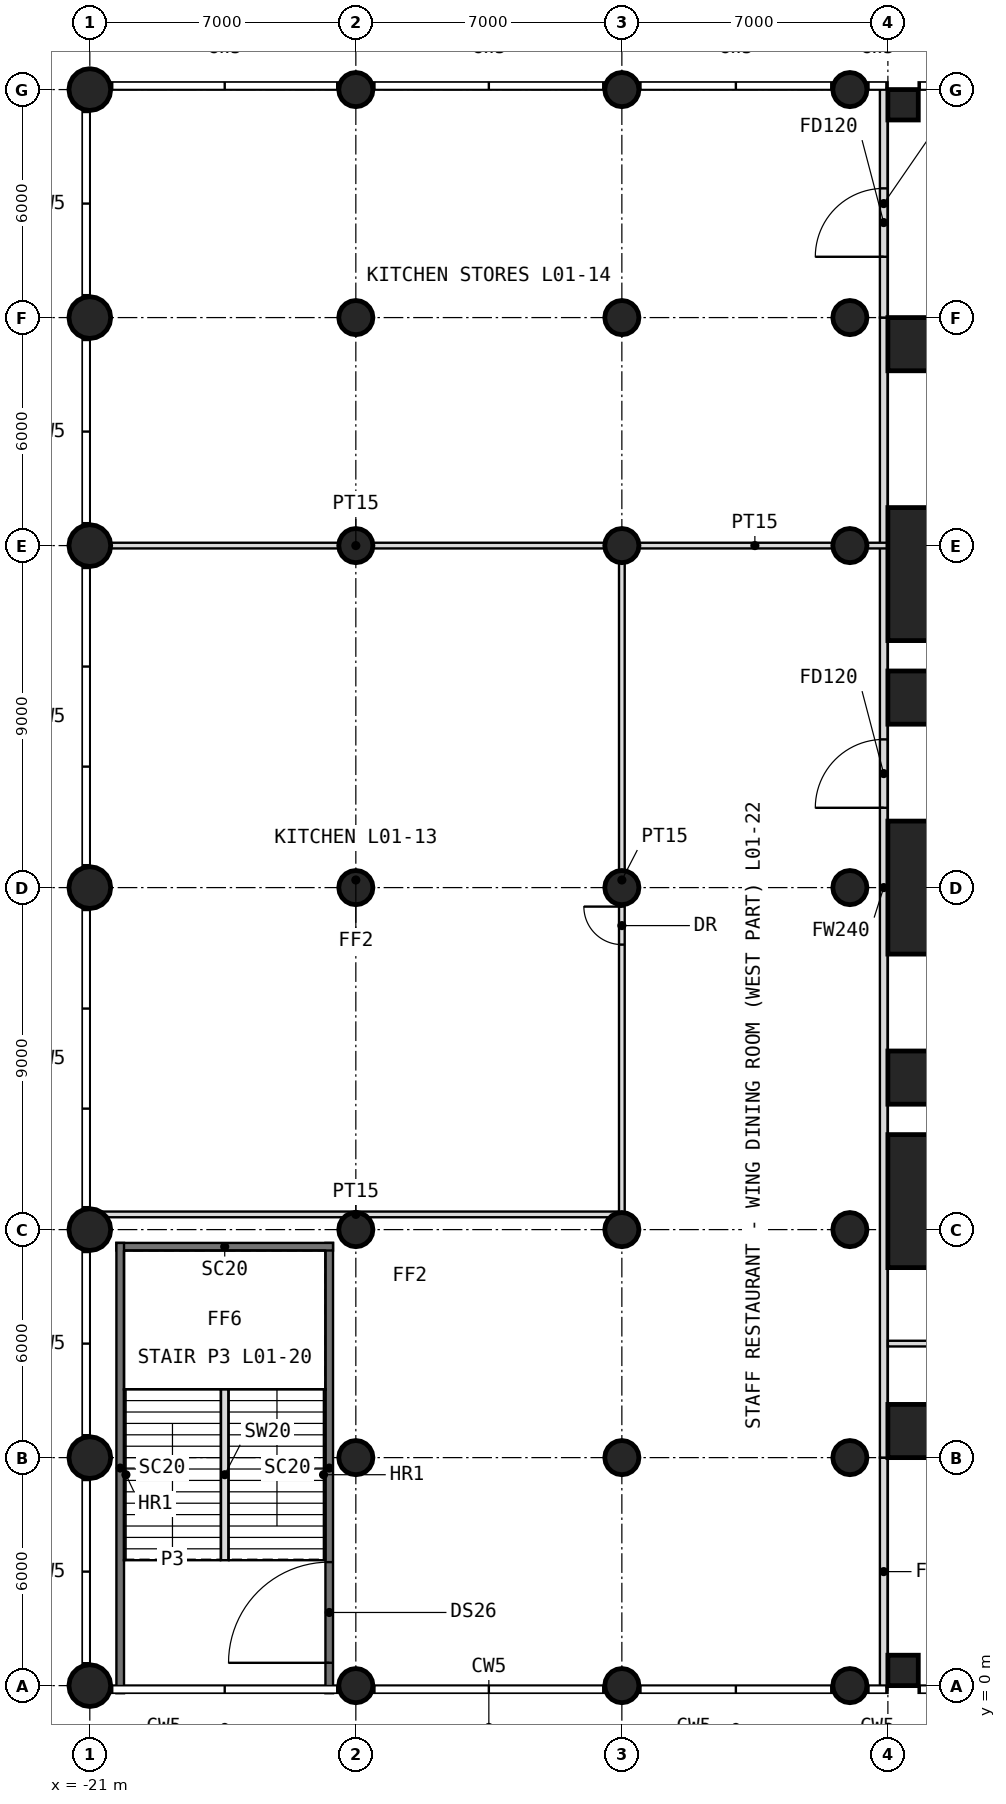
"""IFC4 building model, lengths in metres.
Left out: names, types, materials, properties, quantities, classifications, styles, units other than length and angle.
Written with IfcOpenShell. Run it as: python <this file> out.ifc"""

import sys

from ifc_helpers import new_model, si_unit, direction, frame, frame_2d, origin, origin_2d, place, context, subcontext, project, spatial, rectangle, circle, extrude, element, fill, save


model = new_model("IFC4")
c1 = context("Model", 3, precision=1e-05, world=origin(), true_north=direction((0.0, 1.0)))
c2 = subcontext(c1, "Body", "Model", "MODEL_VIEW")
j1 = project(units=[si_unit("LENGTHUNIT", "METRE"), si_unit("PLANEANGLEUNIT", "RADIAN")], contexts=[c1])
p1 = place(None, origin())
s1 = spatial("IfcSite", under=j1, at=p1, CompositionType="ELEMENT")
p2 = place(p1, origin())
s2 = spatial("IfcBuilding", under=s1, at=p2, CompositionType="ELEMENT")
p3 = place(p2, frame((0.0, 0.0, 6.0)))
s3 = spatial("IfcBuildingStorey", under=s2, at=p3, CompositionType="ELEMENT", Elevation=6.0)
p4 = place(p3, frame((-21.0, 0.0, 0.0), z_axis=(0.0, 0.0, 1.0), x_axis=(1.0, 0.0, 0.0)))
e1 = element("IfcColumn", 1, at=p4, inside=s3, PredefinedType="COLUMN", context=c2, shape_type="SweptSolid", body=[
    extrude(circle(Radius=0.55, at=origin_2d()), origin(), (0.0, 0.0, 1.0), 5.0),
])
for number, where, z_axis, x_axis in (
    (2, (-14.0, 0.0, 0.0), (0.0, 0.0, 1.0), (1.0, 0.0, 0.0)),
    (3, (-7.0, 0.0, 0.0), (0.0, 0.0, 1.0), (1.0, 0.0, 0.0)),
    (4, (-1.0, 0.0, 0.0), (0.0, 0.0, 1.0), (1.0, 0.0, 0.0)),
):
    element("IfcColumn", number, at=place(p3, frame(where, z_axis=z_axis, x_axis=x_axis)), inside=s3, PredefinedType="COLUMN", context=c2, shape_type="SweptSolid", body=[
        extrude(circle(Radius=0.45, at=origin_2d()), origin(), (0.0, 0.0, 1.0), 5.0),
    ])
p5 = place(p3, frame((0.4, 0.4, 0.0), z_axis=(0.0, 0.0, 1.0), x_axis=(1.0, 0.0, 0.0)))
e5 = element("IfcColumn", 5, at=p5, inside=s3, PredefinedType="COLUMN", context=c2, shape_type="SweptSolid", body=[
    extrude(rectangle(XDim=0.8, YDim=0.8, at=origin_2d()), origin(), (0.0, 0.0, 1.0), 5.0),
])
p6 = place(p3, frame((-21.0, 6.0, 0.0), z_axis=(0.0, 0.0, 1.0), x_axis=(1.0, 0.0, 0.0)))
e6 = element("IfcColumn", 6, at=p6, inside=s3, PredefinedType="COLUMN", context=c2, shape_type="SweptSolid", body=[
    extrude(circle(Radius=0.55, at=origin_2d()), origin(), (0.0, 0.0, 1.0), 5.0),
])
for number, where, z_axis, x_axis in (
    (7, (-14.0, 6.0, 0.0), (0.0, 0.0, 1.0), (1.0, 0.0, 0.0)),
    (8, (-7.0, 6.0, 0.0), (0.0, 0.0, 1.0), (1.0, 0.0, 0.0)),
    (9, (-1.0, 6.0, 0.0), (0.0, 0.0, 1.0), (1.0, 0.0, 0.0)),
):
    element("IfcColumn", number, at=place(p3, frame(where, z_axis=z_axis, x_axis=x_axis)), inside=s3, PredefinedType="COLUMN", context=c2, shape_type="SweptSolid", body=[
        extrude(circle(Radius=0.45, at=origin_2d()), origin(), (0.0, 0.0, 1.0), 5.0),
    ])
p7 = place(p3, frame((0.7, 6.7, 0.0), z_axis=(0.0, 0.0, 1.0), x_axis=(1.0, 0.0, 0.0)))
e10 = element("IfcColumn", 10, at=p7, inside=s3, PredefinedType="COLUMN", context=c2, shape_type="SweptSolid", body=[
    extrude(rectangle(XDim=1.4, YDim=1.4, at=origin_2d()), origin(), (0.0, 0.0, 1.0), 5.0),
])
p8 = place(p3, frame((1.75, 12.75, 0.0), z_axis=(0.0, 0.0, 1.0), x_axis=(1.0, 0.0, 0.0)))
e11 = element("IfcColumn", 11, at=p8, inside=s3, PredefinedType="COLUMN", context=c2, shape_type="SweptSolid", body=[
    extrude(rectangle(XDim=3.5, YDim=3.5, at=origin_2d()), origin(), (0.0, 0.0, 1.0), 5.0),
])
p9 = place(p3, frame((-21.0, 12.0, 0.0), z_axis=(0.0, 0.0, 1.0), x_axis=(1.0, 0.0, 0.0)))
e12 = element("IfcColumn", 12, at=p9, inside=s3, PredefinedType="COLUMN", context=c2, shape_type="SweptSolid", body=[
    extrude(circle(Radius=0.55, at=origin_2d()), origin(), (0.0, 0.0, 1.0), 5.0),
])
for number, where, z_axis, x_axis in (
    (13, (-14.0, 12.0, 0.0), (0.0, 0.0, 1.0), (1.0, 0.0, 0.0)),
    (14, (-7.0, 12.0, 0.0), (0.0, 0.0, 1.0), (1.0, 0.0, 0.0)),
    (15, (-1.0, 12.0, 0.0), (0.0, 0.0, 1.0), (1.0, 0.0, 0.0)),
):
    element("IfcColumn", number, at=place(p3, frame(where, z_axis=z_axis, x_axis=x_axis)), inside=s3, PredefinedType="COLUMN", context=c2, shape_type="SweptSolid", body=[
        extrude(circle(Radius=0.45, at=origin_2d()), origin(), (0.0, 0.0, 1.0), 5.0),
    ])
p10 = place(p3, frame((0.7, 16.0, 0.0), z_axis=(0.0, 0.0, 1.0), x_axis=(1.0, 0.0, 0.0)))
e16 = element("IfcColumn", 16, at=p10, inside=s3, PredefinedType="COLUMN", context=c2, shape_type="SweptSolid", body=[
    extrude(rectangle(XDim=1.4, YDim=1.4, at=origin_2d()), origin(), (0.0, 0.0, 1.0), 5.0),
])
p11 = place(p3, frame((-21.0, 21.0, 0.0), z_axis=(0.0, 0.0, 1.0), x_axis=(1.0, 0.0, 0.0)))
e17 = element("IfcColumn", 17, at=p11, inside=s3, PredefinedType="COLUMN", context=c2, shape_type="SweptSolid", body=[
    extrude(circle(Radius=0.55, at=origin_2d()), origin(), (0.0, 0.0, 1.0), 5.0),
])
for number, where, z_axis, x_axis in (
    (18, (-14.0, 21.0, 0.0), (0.0, 0.0, 1.0), (1.0, 0.0, 0.0)),
    (19, (-7.0, 21.0, 0.0), (0.0, 0.0, 1.0), (1.0, 0.0, 0.0)),
    (20, (-1.0, 21.0, 0.0), (0.0, 0.0, 1.0), (1.0, 0.0, 0.0)),
):
    element("IfcColumn", number, at=place(p3, frame(where, z_axis=z_axis, x_axis=x_axis)), inside=s3, PredefinedType="COLUMN", context=c2, shape_type="SweptSolid", body=[
        extrude(circle(Radius=0.45, at=origin_2d()), origin(), (0.0, 0.0, 1.0), 5.0),
    ])
p12 = place(p3, frame((1.75, 21.0, 0.0), z_axis=(0.0, 0.0, 1.0), x_axis=(1.0, 0.0, 0.0)))
e21 = element("IfcColumn", 21, at=p12, inside=s3, PredefinedType="COLUMN", context=c2, shape_type="SweptSolid", body=[
    extrude(rectangle(XDim=3.5, YDim=3.5, at=origin_2d()), origin(), (0.0, 0.0, 1.0), 5.0),
])
p13 = place(p3, frame((0.7, 26.0, 0.0), z_axis=(0.0, 0.0, 1.0), x_axis=(1.0, 0.0, 0.0)))
e22 = element("IfcColumn", 22, at=p13, inside=s3, PredefinedType="COLUMN", context=c2, shape_type="SweptSolid", body=[
    extrude(rectangle(XDim=1.4, YDim=1.4, at=origin_2d()), origin(), (0.0, 0.0, 1.0), 5.0),
])
p14 = place(p3, frame((-21.0, 30.0, 0.0), z_axis=(0.0, 0.0, 1.0), x_axis=(1.0, 0.0, 0.0)))
e23 = element("IfcColumn", 23, at=p14, inside=s3, PredefinedType="COLUMN", context=c2, shape_type="SweptSolid", body=[
    extrude(circle(Radius=0.55, at=origin_2d()), origin(), (0.0, 0.0, 1.0), 5.0),
])
for number, where, z_axis, x_axis in (
    (24, (-14.0, 30.0, 0.0), (0.0, 0.0, 1.0), (1.0, 0.0, 0.0)),
    (25, (-7.0, 30.0, 0.0), (0.0, 0.0, 1.0), (1.0, 0.0, 0.0)),
    (26, (-1.0, 30.0, 0.0), (0.0, 0.0, 1.0), (1.0, 0.0, 0.0)),
):
    element("IfcColumn", number, at=place(p3, frame(where, z_axis=z_axis, x_axis=x_axis)), inside=s3, PredefinedType="COLUMN", context=c2, shape_type="SweptSolid", body=[
        extrude(circle(Radius=0.45, at=origin_2d()), origin(), (0.0, 0.0, 1.0), 5.0),
    ])
p15 = place(p3, frame((1.75, 29.25, 0.0), z_axis=(0.0, 0.0, 1.0), x_axis=(1.0, 0.0, 0.0)))
e27 = element("IfcColumn", 27, at=p15, inside=s3, PredefinedType="COLUMN", context=c2, shape_type="SweptSolid", body=[
    extrude(rectangle(XDim=3.5, YDim=3.5, at=origin_2d()), origin(), (0.0, 0.0, 1.0), 5.0),
])
p16 = place(p3, frame((-21.0, 36.0, 0.0), z_axis=(0.0, 0.0, 1.0), x_axis=(1.0, 0.0, 0.0)))
e28 = element("IfcColumn", 28, at=p16, inside=s3, PredefinedType="COLUMN", context=c2, shape_type="SweptSolid", body=[
    extrude(circle(Radius=0.55, at=origin_2d()), origin(), (0.0, 0.0, 1.0), 5.0),
])
for number, where, z_axis, x_axis in (
    (29, (-14.0, 36.0, 0.0), (0.0, 0.0, 1.0), (1.0, 0.0, 0.0)),
    (30, (-7.0, 36.0, 0.0), (0.0, 0.0, 1.0), (1.0, 0.0, 0.0)),
    (31, (-1.0, 36.0, 0.0), (0.0, 0.0, 1.0), (1.0, 0.0, 0.0)),
):
    element("IfcColumn", number, at=place(p3, frame(where, z_axis=z_axis, x_axis=x_axis)), inside=s3, PredefinedType="COLUMN", context=c2, shape_type="SweptSolid", body=[
        extrude(circle(Radius=0.45, at=origin_2d()), origin(), (0.0, 0.0, 1.0), 5.0),
    ])
p17 = place(p3, frame((0.7, 35.3, 0.0), z_axis=(0.0, 0.0, 1.0), x_axis=(1.0, 0.0, 0.0)))
e32 = element("IfcColumn", 32, at=p17, inside=s3, PredefinedType="COLUMN", context=c2, shape_type="SweptSolid", body=[
    extrude(rectangle(XDim=1.4, YDim=1.4, at=origin_2d()), origin(), (0.0, 0.0, 1.0), 5.0),
])
p18 = place(p3, frame((-21.0, 42.0, 0.0), z_axis=(0.0, 0.0, 1.0), x_axis=(1.0, 0.0, 0.0)))
e33 = element("IfcColumn", 33, at=p18, inside=s3, PredefinedType="COLUMN", context=c2, shape_type="SweptSolid", body=[
    extrude(circle(Radius=0.55, at=origin_2d()), origin(), (0.0, 0.0, 1.0), 5.0),
])
for number, where, z_axis, x_axis in (
    (34, (-14.0, 42.0, 0.0), (0.0, 0.0, 1.0), (1.0, 0.0, 0.0)),
    (35, (-7.0, 42.0, 0.0), (0.0, 0.0, 1.0), (1.0, 0.0, 0.0)),
    (36, (-1.0, 42.0, 0.0), (0.0, 0.0, 1.0), (1.0, 0.0, 0.0)),
):
    element("IfcColumn", number, at=place(p3, frame(where, z_axis=z_axis, x_axis=x_axis)), inside=s3, PredefinedType="COLUMN", context=c2, shape_type="SweptSolid", body=[
        extrude(circle(Radius=0.45, at=origin_2d()), origin(), (0.0, 0.0, 1.0), 5.0),
    ])
p19 = place(p3, frame((0.4, 41.6, 0.0), z_axis=(0.0, 0.0, 1.0), x_axis=(1.0, 0.0, 0.0)))
e37 = element("IfcColumn", 37, at=p19, inside=s3, PredefinedType="COLUMN", context=c2, shape_type="SweptSolid", body=[
    extrude(rectangle(XDim=0.8, YDim=0.8, at=origin_2d()), origin(), (0.0, 0.0, 1.0), 5.0),
])
p20 = place(p3, frame((-14.7, -0.2, -0.2), z_axis=(0.0, 0.0, 1.0), x_axis=(0.0, 1.0, 0.0)))
e38 = element("IfcWall", 38, at=p20, inside=s3, PredefinedType="SOLIDWALL", context=c2, shape_type="SweptSolid", body=[
    extrude(rectangle(XDim=11.85, YDim=0.2, at=frame_2d((5.925, 0.0))), origin(), (0.0, 0.0, 1.0), 4.9),
])
p21 = place(p20, frame((0.8, 0.0, 0.2)))
e39 = element("IfcOpeningElement", 39, at=p21, cuts=e38, PredefinedType="OPENING", context=c2, shape_type="SweptSolid", body=[
    extrude(rectangle(XDim=2.65, YDim=2.4, at=frame_2d((1.325, 1.2))), frame((0.0, 0.11, 0.0), z_axis=(0.0, -1.0, 0.0), x_axis=(1.0, 0.0, 0.0)), (0.0, 0.0, 1.0), 0.22),
])
p22 = place(p3, frame((-14.6, 11.55, -0.2), z_axis=(0.0, 0.0, 1.0), x_axis=(-1.0, 0.0, 0.0)))
e40 = element("IfcWall", 40, at=p22, inside=s3, PredefinedType="SOLIDWALL", context=c2, shape_type="SweptSolid", body=[
    extrude(rectangle(XDim=5.7, YDim=0.2, at=frame_2d((2.85, 0.0))), origin(), (0.0, 0.0, 1.0), 4.9),
])
p23 = place(p3, frame((-20.2, 11.65, -0.2), z_axis=(0.0, 0.0, 1.0), x_axis=(0.0, -1.0, 0.0)))
e41 = element("IfcWall", 41, at=p23, inside=s3, PredefinedType="SOLIDWALL", context=c2, shape_type="SweptSolid", body=[
    extrude(rectangle(XDim=11.85, YDim=0.2, at=frame_2d((5.925, 0.0))), origin(), (0.0, 0.0, 1.0), 4.9),
])
p24 = place(p3, frame((-0.11, 0.0, 0.0), z_axis=(0.0, 0.0, 1.0), x_axis=(0.0, 1.0, 0.0)))
e42 = element("IfcWall", 42, at=p24, inside=s3, PredefinedType="PARTITIONING", context=c2, shape_type="SweptSolid", body=[
    extrude(rectangle(XDim=6.0, YDim=0.2, at=frame_2d((3.0, 0.0))), origin(), (0.0, 0.0, 1.0), 3.88),
])
p25 = place(p3, frame((-0.11, 6.0, 0.0), z_axis=(0.0, 0.0, 1.0), x_axis=(0.0, 1.0, 0.0)))
e43 = element("IfcWall", 43, at=p25, inside=s3, PredefinedType="PARTITIONING", context=c2, shape_type="SweptSolid", body=[
    extrude(rectangle(XDim=30.0, YDim=0.2, at=frame_2d((15.0, 0.0))), origin(), (0.0, 0.0, 1.0), 4.5),
])
p26 = place(p25, frame((17.1, 0.0, 0.0)))
e44 = element("IfcOpeningElement", 44, at=p26, cuts=e43, PredefinedType="OPENING", context=c2, shape_type="SweptSolid", body=[
    extrude(rectangle(XDim=1.8, YDim=2.4, at=frame_2d((0.9, 1.2))), frame((0.0, 0.11, 0.0), z_axis=(0.0, -1.0, 0.0), x_axis=(1.0, 0.0, 0.0)), (0.0, 0.0, 1.0), 0.22),
])
p27 = place(p3, frame((-0.11, 36.0, 0.0), z_axis=(0.0, 0.0, 1.0), x_axis=(0.0, 1.0, 0.0)))
e45 = element("IfcWall", 45, at=p27, inside=s3, PredefinedType="PARTITIONING", context=c2, shape_type="SweptSolid", body=[
    extrude(rectangle(XDim=6.0, YDim=0.2, at=frame_2d((3.0, 0.0))), origin(), (0.0, 0.0, 1.0), 3.88),
])
p28 = place(p27, frame((1.6, 0.0, 0.0)))
e46 = element("IfcOpeningElement", 46, at=p28, cuts=e45, PredefinedType="OPENING", context=c2, shape_type="SweptSolid", body=[
    extrude(rectangle(XDim=1.8, YDim=2.4, at=frame_2d((0.9, 1.2))), frame((0.0, 0.11, 0.0), z_axis=(0.0, -1.0, 0.0), x_axis=(1.0, 0.0, 0.0)), (0.0, 0.0, 1.0), 0.22),
])
p29 = place(p3, frame((-21.0, 12.4, 0.0), z_axis=(0.0, 0.0, 1.0), x_axis=(1.0, 0.0, 0.0)))
e47 = element("IfcWall", 47, at=p29, inside=s3, PredefinedType="PARTITIONING", context=c2, shape_type="SweptSolid", body=[
    extrude(rectangle(XDim=14.0, YDim=0.15, at=frame_2d((7.0, 0.0))), origin(), (0.0, 0.0, 1.0), 4.5),
])
p30 = place(p3, frame((-21.0, 30.0, 0.0), z_axis=(0.0, 0.0, 1.0), x_axis=(1.0, 0.0, 0.0)))
e48 = element("IfcWall", 48, at=p30, inside=s3, PredefinedType="PARTITIONING", context=c2, shape_type="SweptSolid", body=[
    extrude(rectangle(XDim=14.0, YDim=0.15, at=frame_2d((7.0, 0.0))), origin(), (0.0, 0.0, 1.0), 3.5),
])
p31 = place(p3, frame((-7.0, 12.4, 0.0), z_axis=(0.0, 0.0, 1.0), x_axis=(0.0, 1.0, 0.0)))
e49 = element("IfcWall", 49, at=p31, inside=s3, PredefinedType="PARTITIONING", context=c2, shape_type="SweptSolid", body=[
    extrude(rectangle(XDim=17.6, YDim=0.15, at=frame_2d((8.8, 0.0))), origin(), (0.0, 0.0, 1.0), 3.5),
])
p32 = place(p31, frame((7.1, 0.0, 0.0)))
e50 = element("IfcOpeningElement", 50, at=p32, cuts=e49, PredefinedType="OPENING", context=c2, shape_type="SweptSolid", body=[
    extrude(rectangle(XDim=1.0, YDim=2.2, at=frame_2d((0.5, 1.1))), frame((0.0, 0.085, 0.0), z_axis=(0.0, -1.0, 0.0), x_axis=(1.0, 0.0, 0.0)), (0.0, 0.0, 1.0), 0.17),
])
p33 = place(p3, frame((-7.0, 30.0, 0.0), z_axis=(0.0, 0.0, 1.0), x_axis=(1.0, 0.0, 0.0)))
e51 = element("IfcWall", 51, at=p33, inside=s3, PredefinedType="PARTITIONING", context=c2, shape_type="SweptSolid", body=[
    extrude(rectangle(XDim=7.0, YDim=0.15, at=frame_2d((3.5, 0.0))), origin(), (0.0, 0.0, 1.0), 3.5),
])
p34 = place(p3, frame((0.0, 9.0, 0.0), z_axis=(0.0, 0.0, 1.0), x_axis=(1.0, 0.0, 0.0)))
e52 = element("IfcWall", 52, at=p34, inside=s3, PredefinedType="PARTITIONING", context=c2, shape_type="SweptSolid", body=[
    extrude(rectangle(XDim=12.0, YDim=0.15, at=frame_2d((6.0, 0.0))), origin(), (0.0, 0.0, 1.0), 4.5),
])
p35 = place(p34, frame((1.5, 0.0, 0.0)))
e53 = element("IfcOpeningElement", 53, at=p35, cuts=e52, PredefinedType="OPENING", context=c2, shape_type="SweptSolid", body=[
    extrude(rectangle(XDim=1.0, YDim=2.2, at=frame_2d((0.5, 1.1))), frame((0.0, 0.085, 0.0), z_axis=(0.0, -1.0, 0.0), x_axis=(1.0, 0.0, 0.0)), (0.0, 0.0, 1.0), 0.17),
])
p36 = place(p3, frame((-17.45, 3.3, 0.0), z_axis=(0.0, 0.0, 1.0), x_axis=(0.0, 1.0, 0.0)))
e54 = element("IfcWall", 54, at=p36, inside=s3, PredefinedType="PARTITIONING", context=c2, shape_type="SweptSolid", body=[
    extrude(rectangle(XDim=4.5, YDim=0.2, at=frame_2d((2.25, 0.0))), origin(), (0.0, 0.0, 1.0), 5.0),
])
p37 = place(p21, origin())
e55 = element("IfcDoor", 55, at=p37, inside=s3, OperationType="DOUBLE_DOOR_SINGLE_SWING", PredefinedType="DOOR", context=c2, shape_type="SweptSolid", body=[
    extrude(rectangle(XDim=2.65, YDim=2.4, at=frame_2d((1.325, 1.2))), frame((0.0, 0.025, 0.0), z_axis=(0.0, -1.0, 0.0), x_axis=(1.0, 0.0, 0.0)), (0.0, 0.0, 1.0), 0.05),
])
fill(e39, e55)
p38 = place(p26, origin())
e56 = element("IfcDoor", 56, at=p38, inside=s3, OperationType="DOUBLE_DOOR_SINGLE_SWING", PredefinedType="DOOR", context=c2, shape_type="SweptSolid", body=[
    extrude(rectangle(XDim=1.8, YDim=2.4, at=frame_2d((0.9, 1.2))), frame((0.0, 0.025, 0.0), z_axis=(0.0, -1.0, 0.0), x_axis=(1.0, 0.0, 0.0)), (0.0, 0.0, 1.0), 0.05),
])
fill(e44, e56)
p39 = place(p32, origin())
e57 = element("IfcDoor", 57, at=p39, inside=s3, OperationType="SINGLE_SWING_RIGHT", PredefinedType="DOOR", context=c2, shape_type="SweptSolid", body=[
    extrude(rectangle(XDim=1.0, YDim=2.2, at=frame_2d((0.5, 1.1))), frame((0.0, 0.025, 0.0), z_axis=(0.0, -1.0, 0.0), x_axis=(1.0, 0.0, 0.0)), (0.0, 0.0, 1.0), 0.05),
])
fill(e50, e57)
p40 = place(p28, origin())
e58 = element("IfcDoor", 58, at=p40, inside=s3, OperationType="DOUBLE_DOOR_SINGLE_SWING", PredefinedType="DOOR", context=c2, shape_type="SweptSolid", body=[
    extrude(rectangle(XDim=1.8, YDim=2.4, at=frame_2d((0.9, 1.2))), frame((0.0, 0.025, 0.0), z_axis=(0.0, -1.0, 0.0), x_axis=(1.0, 0.0, 0.0)), (0.0, 0.0, 1.0), 0.05),
])
fill(e46, e58)
save(model, sys.argv[1])
